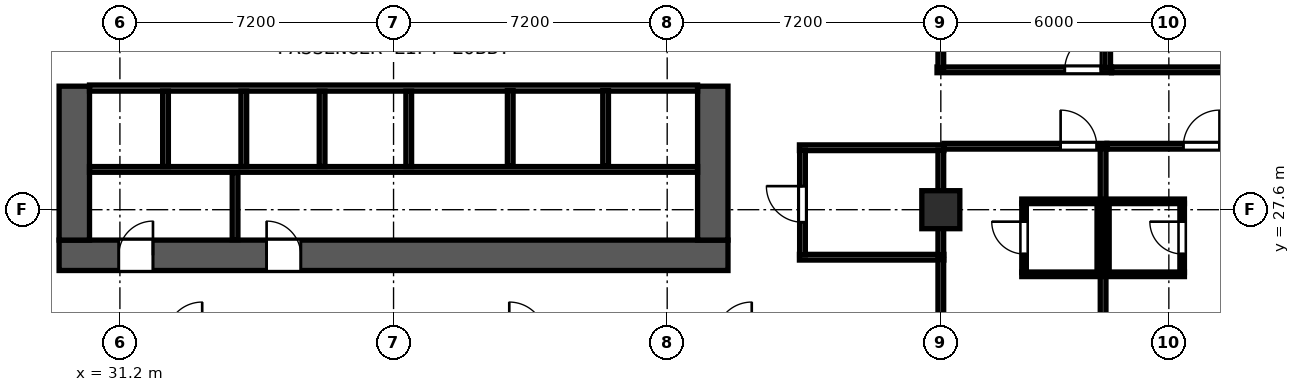
"""IFC4 building model, lengths in metres.
Left out: names, types, materials, properties, quantities, classifications, styles, units other than length and angle.
Written with IfcOpenShell. Run it as: python <this file> out.ifc"""

import sys

from ifc_helpers import new_model, si_unit, direction, frame, frame_2d, origin, origin_2d, place, context, subcontext, project, spatial, rectangle, hollow_rectangle, extrude, element, fill, save


model = new_model("IFC4")
c1 = context("Model", 3, precision=1e-05, world=origin(), true_north=direction((0.0, 1.0)))
c2 = subcontext(c1, "Body", "Model", "MODEL_VIEW")
j1 = project(units=[si_unit("LENGTHUNIT", "METRE"), si_unit("PLANEANGLEUNIT", "RADIAN")], contexts=[c1])
p1 = place(None, origin())
s1 = spatial("IfcSite", under=j1, at=p1, CompositionType="ELEMENT")
p2 = place(p1, origin())
s2 = spatial("IfcBuilding", under=s1, at=p2, CompositionType="ELEMENT")
p3 = place(p2, frame((0.0, 0.0, 62.8)))
s3 = spatial("IfcBuildingStorey", under=s2, at=p3, CompositionType="ELEMENT", Elevation=62.8)
p4 = place(p3, frame((29.6, 26.4, 0.0), z_axis=(0.0, 0.0, 1.0), x_axis=(1.0, 0.0, 0.0)))
e1 = element("IfcWall", 1, at=p4, inside=s3, PredefinedType="SHEAR", context=c2, shape_type="SweptSolid", body=[
    extrude(rectangle(XDim=17.6, YDim=0.8, at=frame_2d((8.8, 0.0))), origin(), (0.0, 0.0, 1.0), 3.6),
])
p5 = place(p4, frame((2.47, 0.0, 0.0), z_axis=(0.0, 0.0, 1.0), x_axis=(-1.0, 0.0, 0.0)))
e2 = element("IfcOpeningElement", 2, at=p5, cuts=e1, PredefinedType="OPENING", context=c2, shape_type="SweptSolid", body=[
    extrude(rectangle(XDim=0.9, YDim=2.1, at=frame_2d((0.45, 1.05))), frame((0.0, 0.41, 0.0), z_axis=(0.0, -1.0, 0.0), x_axis=(1.0, 0.0, 0.0)), (0.0, 0.0, 1.0), 0.82),
])
p6 = place(p4, frame((6.36, 0.0, 0.0), z_axis=(0.0, 0.0, 1.0), x_axis=(-1.0, 0.0, 0.0)))
e3 = element("IfcOpeningElement", 3, at=p6, cuts=e1, PredefinedType="OPENING", context=c2, shape_type="SweptSolid", body=[
    extrude(rectangle(XDim=0.9, YDim=2.1, at=frame_2d((0.45, 1.05))), frame((0.0, 0.41, 0.0), z_axis=(0.0, -1.0, 0.0), x_axis=(1.0, 0.0, 0.0)), (0.0, 0.0, 1.0), 0.82),
])
for number, where, z_axis, x_axis in (
    (4, (30.0, 26.8, 0.0), (0.0, 0.0, 1.0), (0.0, 1.0, 0.0)),
    (5, (46.8, 26.8, 0.0), (0.0, 0.0, 1.0), (0.0, 1.0, 0.0)),
):
    element("IfcWall", number, at=place(p3, frame(where, z_axis=z_axis, x_axis=x_axis)), inside=s3, PredefinedType="SHEAR", context=c2, shape_type="SweptSolid", body=[
        extrude(rectangle(XDim=4.05, YDim=0.8, at=frame_2d((2.025, 0.0))), origin(), (0.0, 0.0, 1.0), 3.6),
    ])
p7 = place(p3, frame((52.8, 27.6, 0.0), z_axis=(0.0, 0.0, 1.0), x_axis=(1.0, 0.0, 0.0)))
e6 = element("IfcColumn", 6, at=p7, inside=s3, PredefinedType="COLUMN", context=c2, shape_type="SweptSolid", body=[
    extrude(hollow_rectangle(XDim=1.0, YDim=1.0, WallThickness=0.038, at=origin_2d()), origin(), (0.0, 0.0, 1.0), 3.8),
])
p8 = place(p3, frame((30.4, 30.8, 0.0), z_axis=(0.0, 0.0, 1.0), x_axis=(1.0, 0.0, 0.0)))
e7 = element("IfcWall", 7, at=p8, inside=s3, PredefinedType="SOLIDWALL", context=c2, shape_type="SweptSolid", body=[
    extrude(rectangle(XDim=16.0, YDim=0.16, at=frame_2d((8.0, 0.0))), origin(), (0.0, 0.0, 1.0), 3.6),
])
p9 = place(p3, frame((30.4, 28.66, 0.0), z_axis=(0.0, 0.0, 1.0), x_axis=(1.0, 0.0, 0.0)))
e8 = element("IfcWall", 8, at=p9, inside=s3, PredefinedType="PARTITIONING", context=c2, shape_type="SweptSolid", body=[
    extrude(rectangle(XDim=16.0, YDim=0.15, at=frame_2d((8.0, 0.0))), origin(), (0.0, 0.0, 1.0), 3.6),
])
for number, where, z_axis, x_axis in (
    (9, (32.4, 28.735, 0.0), (0.0, 0.0, 1.0), (0.0, 1.0, 0.0)),
    (10, (34.46, 28.735, 0.0), (0.0, 0.0, 1.0), (0.0, 1.0, 0.0)),
    (11, (36.52, 28.735, 0.0), (0.0, 0.0, 1.0), (0.0, 1.0, 0.0)),
    (12, (38.8, 28.735, 0.0), (0.0, 0.0, 1.0), (0.0, 1.0, 0.0)),
):
    element("IfcWall", number, at=place(p3, frame(where, z_axis=z_axis, x_axis=x_axis)), inside=s3, PredefinedType="SOLIDWALL", context=c2, shape_type="SweptSolid", body=[
        extrude(rectangle(XDim=1.985, YDim=0.15, at=frame_2d((0.992, 0.0))), origin(), (0.0, 0.0, 1.0), 3.6),
    ])
p10 = place(p3, frame((34.23, 26.81, 0.0), z_axis=(0.0, 0.0, 1.0), x_axis=(0.0, 1.0, 0.0)))
e13 = element("IfcWall", 13, at=p10, inside=s3, PredefinedType="PARTITIONING", context=c2, shape_type="SweptSolid", body=[
    extrude(rectangle(XDim=1.77, YDim=0.15, at=frame_2d((0.885, 0.0))), origin(), (0.0, 0.0, 1.0), 3.6),
])
for number, where, z_axis, x_axis in (
    (14, (41.47, 28.75, 0.0), (0.0, 0.0, 1.0), (0.0, 1.0, 0.0)),
    (15, (43.98, 28.75, 0.0), (0.0, 0.0, 1.0), (0.0, 1.0, 0.0)),
):
    element("IfcWall", number, at=place(p3, frame(where, z_axis=z_axis, x_axis=x_axis)), inside=s3, PredefinedType="SOLIDWALL", context=c2, shape_type="SweptSolid", body=[
        extrude(rectangle(XDim=1.985, YDim=0.15, at=frame_2d((0.993, 0.0))), origin(), (0.0, 0.0, 1.0), 3.6),
    ])
for number, where, z_axis, x_axis in (
    (16, (49.08, 29.23, 0.0), (0.0, 0.0, 1.0), (1.0, 0.0, 0.0)),
    (17, (49.08, 26.35, 0.0), (0.0, 0.0, 1.0), (1.0, 0.0, 0.0)),
):
    element("IfcWall", number, at=place(p3, frame(where, z_axis=z_axis, x_axis=x_axis)), inside=s3, PredefinedType="PARTITIONING", context=c2, shape_type="SweptSolid", body=[
        extrude(rectangle(XDim=3.8, YDim=0.15, at=frame_2d((1.9, 0.0))), origin(), (0.0, 0.0, 1.0), 3.6),
    ])
p11 = place(p3, frame((49.16, 26.41, 0.0), z_axis=(0.0, 0.0, 1.0), x_axis=(0.0, 1.0, 0.0)))
e18 = element("IfcWall", 18, at=p11, inside=s3, PredefinedType="PARTITIONING", context=c2, shape_type="SweptSolid", body=[
    extrude(rectangle(XDim=2.76, YDim=0.15, at=frame_2d((1.38, 0.0))), origin(), (0.0, 0.0, 1.0), 3.6),
])
p12 = place(p11, frame((0.86, 0.0, 0.0)))
e19 = element("IfcOpeningElement", 19, at=p12, cuts=e18, PredefinedType="OPENING", context=c2, shape_type="SweptSolid", body=[
    extrude(rectangle(XDim=0.95, YDim=2.12, at=frame_2d((0.475, 1.06))), frame((0.0, 0.085, 0.0), z_axis=(0.0, -1.0, 0.0), x_axis=(1.0, 0.0, 0.0)), (0.0, 0.0, 1.0), 0.17),
])
p13 = place(p3, frame((52.8, 26.41, 0.0), z_axis=(0.0, 0.0, 1.0), x_axis=(0.0, 1.0, 0.0)))
e20 = element("IfcWall", 20, at=p13, inside=s3, PredefinedType="PARTITIONING", context=c2, shape_type="SweptSolid", body=[
    extrude(rectangle(XDim=2.76, YDim=0.15, at=frame_2d((1.38, 0.0))), origin(), (0.0, 0.0, 1.0), 3.097),
])
p14 = place(p3, frame((52.7, 31.28, 0.0), z_axis=(0.0, 0.0, 1.0), x_axis=(1.0, 0.0, 0.0)))
e21 = element("IfcWall", 21, at=p14, inside=s3, PredefinedType="PARTITIONING", context=c2, shape_type="SweptSolid", body=[
    extrude(rectangle(XDim=4.59, YDim=0.15, at=frame_2d((2.295, 0.0))), origin(), (0.0, 0.0, 1.0), 3.6),
])
p15 = place(p14, frame((3.361, 0.0, 0.0)))
e22 = element("IfcOpeningElement", 22, at=p15, cuts=e21, PredefinedType="OPENING", context=c2, shape_type="SweptSolid", body=[
    extrude(rectangle(XDim=0.95, YDim=2.15, at=frame_2d((0.475, 1.075))), frame((0.0, 0.085, 0.0), z_axis=(0.0, -1.0, 0.0), x_axis=(1.0, 0.0, 0.0)), (0.0, 0.0, 1.0), 0.17),
])
p16 = place(p3, frame((52.8, 31.34, 0.0), z_axis=(0.0, 0.0, 1.0), x_axis=(0.0, 1.0, 0.0)))
e23 = element("IfcWall", 23, at=p16, inside=s3, PredefinedType="PARTITIONING", context=c2, shape_type="SweptSolid", body=[
    extrude(rectangle(XDim=1.6, YDim=0.15, at=frame_2d((0.8, 0.0))), origin(), (0.0, 0.0, 1.0), 3.097),
])
p17 = place(p3, frame((57.19, 31.34, 0.0), z_axis=(0.0, 0.0, 1.0), x_axis=(0.0, 1.0, 0.0)))
e24 = element("IfcWall", 24, at=p17, inside=s3, PredefinedType="PARTITIONING", context=c2, shape_type="SweptSolid", body=[
    extrude(rectangle(XDim=11.359, YDim=0.15, at=frame_2d((5.68, 0.0))), origin(), (0.0, 0.0, 1.0), 3.6),
])
p18 = place(p3, frame((57.292, 31.28, 0.0), z_axis=(0.0, 0.0, 1.0), x_axis=(1.0, 0.0, 0.0)))
e25 = element("IfcWall", 25, at=p18, inside=s3, PredefinedType="PARTITIONING", context=c2, shape_type="SweptSolid", body=[
    extrude(rectangle(XDim=7.808, YDim=0.15, at=frame_2d((3.904, 0.0))), origin(), (0.0, 0.0, 1.0), 3.6),
])
p19 = place(p18, frame((3.551, 0.0, 0.0)))
e26 = element("IfcOpeningElement", 26, at=p19, cuts=e25, PredefinedType="OPENING", context=c2, shape_type="SweptSolid", body=[
    extrude(rectangle(XDim=0.95, YDim=2.18, at=frame_2d((0.475, 1.09))), frame((0.0, 0.085, 0.0), z_axis=(0.0, -1.0, 0.0), x_axis=(1.0, 0.0, 0.0)), (0.0, 0.0, 1.0), 0.17),
])
p20 = place(p3, frame((52.882, 29.27, 0.0), z_axis=(0.0, 0.0, 1.0), x_axis=(1.0, 0.0, 0.0)))
e27 = element("IfcWall", 27, at=p20, inside=s3, PredefinedType="PARTITIONING", context=c2, shape_type="SweptSolid", body=[
    extrude(rectangle(XDim=4.288, YDim=0.15, at=frame_2d((2.144, 0.0))), origin(), (0.0, 0.0, 1.0), 3.6),
])
p21 = place(p20, frame((4.02, 0.0, 0.0), z_axis=(0.0, 0.0, 1.0), x_axis=(-1.0, 0.0, 0.0)))
e28 = element("IfcOpeningElement", 28, at=p21, cuts=e27, PredefinedType="OPENING", context=c2, shape_type="SweptSolid", body=[
    extrude(rectangle(XDim=0.95, YDim=2.15, at=frame_2d((0.475, 1.075))), frame((0.0, 0.085, 0.0), z_axis=(0.0, -1.0, 0.0), x_axis=(1.0, 0.0, 0.0)), (0.0, 0.0, 1.0), 0.17),
])
p22 = place(p3, frame((52.8, 24.28, 0.0), z_axis=(0.0, 0.0, 1.0), x_axis=(0.0, 1.0, 0.0)))
e29 = element("IfcWall", 29, at=p22, inside=s3, PredefinedType="PARTITIONING", context=c2, shape_type="SweptSolid", body=[
    extrude(rectangle(XDim=2.01, YDim=0.15, at=frame_2d((1.005, 0.0))), origin(), (0.0, 0.0, 1.0), 3.097),
])
p23 = place(p3, frame((57.07, 18.803, 0.0), z_axis=(0.0, 0.0, 1.0), x_axis=(0.0, 1.0, 0.0)))
e30 = element("IfcWall", 30, at=p23, inside=s3, PredefinedType="PARTITIONING", context=c2, shape_type="SweptSolid", body=[
    extrude(rectangle(XDim=10.407, YDim=0.15, at=frame_2d((5.204, 0.0))), origin(), (0.0, 0.0, 1.0), 3.6),
])
p24 = place(p3, frame((54.93, 27.82, 0.0), z_axis=(0.0, 0.0, 1.0), x_axis=(1.0, 0.0, 0.0)))
e31 = element("IfcWall", 31, at=p24, inside=s3, PredefinedType="PARTITIONING", context=c2, shape_type="SweptSolid", body=[
    extrude(rectangle(XDim=2.08, YDim=0.12, at=frame_2d((1.04, 0.0))), origin(), (0.0, 0.0, 1.0), 3.097),
])
p25 = place(p3, frame((54.93, 25.9, 0.0), z_axis=(0.0, 0.0, 1.0), x_axis=(1.0, 0.0, 0.0)))
e32 = element("IfcWall", 32, at=p25, inside=s3, PredefinedType="PARTITIONING", context=c2, shape_type="SweptSolid", body=[
    extrude(rectangle(XDim=2.08, YDim=0.12, at=frame_2d((1.04, 0.0))), origin(), (0.0, 0.0, 1.0), 3.6),
])
p26 = place(p3, frame((54.99, 25.945, 0.0), z_axis=(0.0, 0.0, 1.0), x_axis=(0.0, 1.0, 0.0)))
e33 = element("IfcWall", 33, at=p26, inside=s3, PredefinedType="PARTITIONING", context=c2, shape_type="SweptSolid", body=[
    extrude(rectangle(XDim=1.83, YDim=0.12, at=frame_2d((0.915, 0.0))), origin(), (0.0, 0.0, 1.0), 3.6),
])
p27 = place(p26, frame((1.34, 0.0, 0.0), z_axis=(0.0, 0.0, 1.0), x_axis=(-1.0, 0.0, 0.0)))
e34 = element("IfcOpeningElement", 34, at=p27, cuts=e33, PredefinedType="OPENING", context=c2, shape_type="SweptSolid", body=[
    extrude(rectangle(XDim=0.85, YDim=2.1, at=frame_2d((0.425, 1.05))), frame((0.0, 0.07, 0.0), z_axis=(0.0, -1.0, 0.0), x_axis=(1.0, 0.0, 0.0)), (0.0, 0.0, 1.0), 0.14),
])
p28 = place(p3, frame((56.97, 25.945, 0.0), z_axis=(0.0, 0.0, 1.0), x_axis=(0.0, 1.0, 0.0)))
e35 = element("IfcWall", 35, at=p28, inside=s3, PredefinedType="PARTITIONING", context=c2, shape_type="SweptSolid", body=[
    extrude(rectangle(XDim=1.83, YDim=0.12, at=frame_2d((0.915, 0.0))), origin(), (0.0, 0.0, 1.0), 3.6),
])
p29 = place(p3, frame((57.172, 29.27, 0.0), z_axis=(0.0, 0.0, 1.0), x_axis=(1.0, 0.0, 0.0)))
e36 = element("IfcWall", 36, at=p29, inside=s3, PredefinedType="PARTITIONING", context=c2, shape_type="SweptSolid", body=[
    extrude(rectangle(XDim=4.268, YDim=0.15, at=frame_2d((2.134, 0.0))), origin(), (0.0, 0.0, 1.0), 3.6),
])
p30 = place(p29, frame((2.959, 0.0, 0.0), z_axis=(0.0, 0.0, 1.0), x_axis=(-1.0, 0.0, 0.0)))
e37 = element("IfcOpeningElement", 37, at=p30, cuts=e36, PredefinedType="OPENING", context=c2, shape_type="SweptSolid", body=[
    extrude(rectangle(XDim=0.95, YDim=2.15, at=frame_2d((0.475, 1.075))), frame((0.0, 0.085, 0.0), z_axis=(0.0, -1.0, 0.0), x_axis=(1.0, 0.0, 0.0)), (0.0, 0.0, 1.0), 0.17),
])
p31 = place(p3, frame((57.13, 27.82, 0.0), z_axis=(0.0, 0.0, 1.0), x_axis=(1.0, 0.0, 0.0)))
e38 = element("IfcWall", 38, at=p31, inside=s3, PredefinedType="PARTITIONING", context=c2, shape_type="SweptSolid", body=[
    extrude(rectangle(XDim=2.08, YDim=0.12, at=frame_2d((1.04, 0.0))), origin(), (0.0, 0.0, 1.0), 3.097),
])
p32 = place(p3, frame((57.13, 25.9, 0.0), z_axis=(0.0, 0.0, 1.0), x_axis=(1.0, 0.0, 0.0)))
e39 = element("IfcWall", 39, at=p32, inside=s3, PredefinedType="PARTITIONING", context=c2, shape_type="SweptSolid", body=[
    extrude(rectangle(XDim=2.08, YDim=0.12, at=frame_2d((1.04, 0.0))), origin(), (0.0, 0.0, 1.0), 3.6),
])
p33 = place(p3, frame((57.17, 25.945, 0.0), z_axis=(0.0, 0.0, 1.0), x_axis=(0.0, 1.0, 0.0)))
e40 = element("IfcWall", 40, at=p33, inside=s3, PredefinedType="PARTITIONING", context=c2, shape_type="SweptSolid", body=[
    extrude(rectangle(XDim=1.83, YDim=0.12, at=frame_2d((0.915, 0.0))), origin(), (0.0, 0.0, 1.0), 3.6),
])
p34 = place(p3, frame((59.15, 25.945, 0.0), z_axis=(0.0, 0.0, 1.0), x_axis=(0.0, 1.0, 0.0)))
e41 = element("IfcWall", 41, at=p34, inside=s3, PredefinedType="PARTITIONING", context=c2, shape_type="SweptSolid", body=[
    extrude(rectangle(XDim=1.83, YDim=0.12, at=frame_2d((0.915, 0.0))), origin(), (0.0, 0.0, 1.0), 3.6),
])
p35 = place(p34, frame((0.49, 0.0, 0.0)))
e42 = element("IfcOpeningElement", 42, at=p35, cuts=e41, PredefinedType="OPENING", context=c2, shape_type="SweptSolid", body=[
    extrude(rectangle(XDim=0.85, YDim=2.1, at=frame_2d((0.425, 1.05))), frame((0.0, 0.07, 0.0), z_axis=(0.0, -1.0, 0.0), x_axis=(1.0, 0.0, 0.0)), (0.0, 0.0, 1.0), 0.14),
])
p36 = place(p5, origin())
e43 = element("IfcDoor", 43, at=p36, inside=s3, OperationType="SINGLE_SWING_LEFT", PredefinedType="DOOR", context=c2, shape_type="SweptSolid", body=[
    extrude(rectangle(XDim=0.9, YDim=2.1, at=frame_2d((0.45, 1.05))), frame((0.0, -0.195, 0.0), z_axis=(0.0, -1.0, 0.0), x_axis=(1.0, 0.0, 0.0)), (0.0, 0.0, 1.0), 0.05),
])
fill(e2, e43)
p37 = place(p6, origin())
e44 = element("IfcDoor", 44, at=p37, inside=s3, OperationType="SINGLE_SWING_RIGHT", PredefinedType="DOOR", context=c2, shape_type="SweptSolid", body=[
    extrude(rectangle(XDim=0.9, YDim=2.1, at=frame_2d((0.45, 1.05))), frame((0.0, -0.195, 0.0), z_axis=(0.0, -1.0, 0.0), x_axis=(1.0, 0.0, 0.0)), (0.0, 0.0, 1.0), 0.05),
])
fill(e3, e44)
p38 = place(p12, origin())
e45 = element("IfcDoor", 45, at=p38, inside=s3, OperationType="SINGLE_SWING_RIGHT", PredefinedType="DOOR", context=c2, shape_type="SweptSolid", body=[
    extrude(rectangle(XDim=0.95, YDim=2.12, at=frame_2d((0.475, 1.06))), frame((0.0, 0.025, 0.0), z_axis=(0.0, -1.0, 0.0), x_axis=(1.0, 0.0, 0.0)), (0.0, 0.0, 1.0), 0.05),
])
fill(e19, e45)
p39 = place(p15, origin())
e46 = element("IfcDoor", 46, at=p39, inside=s3, OperationType="SINGLE_SWING_RIGHT", PredefinedType="DOOR", context=c2, shape_type="SweptSolid", body=[
    extrude(rectangle(XDim=0.95, YDim=2.15, at=frame_2d((0.475, 1.075))), frame((0.0, 0.025, 0.0), z_axis=(0.0, -1.0, 0.0), x_axis=(1.0, 0.0, 0.0)), (0.0, 0.0, 1.0), 0.05),
])
fill(e22, e46)
p40 = place(p21, origin())
e47 = element("IfcDoor", 47, at=p40, inside=s3, OperationType="SINGLE_SWING_RIGHT", PredefinedType="DOOR", context=c2, shape_type="SweptSolid", body=[
    extrude(rectangle(XDim=0.95, YDim=2.15, at=frame_2d((0.475, 1.075))), frame((0.0, 0.025, 0.0), z_axis=(0.0, -1.0, 0.0), x_axis=(1.0, 0.0, 0.0)), (0.0, 0.0, 1.0), 0.05),
])
fill(e28, e47)
p41 = place(p27, origin())
e48 = element("IfcDoor", 48, at=p41, inside=s3, OperationType="SINGLE_SWING_LEFT", PredefinedType="DOOR", context=c2, shape_type="SweptSolid", body=[
    extrude(rectangle(XDim=0.85, YDim=2.1, at=frame_2d((0.425, 1.05))), frame((0.0, 0.025, 0.0), z_axis=(0.0, -1.0, 0.0), x_axis=(1.0, 0.0, 0.0)), (0.0, 0.0, 1.0), 0.05),
])
fill(e34, e48)
p42 = place(p30, origin())
e49 = element("IfcDoor", 49, at=p42, inside=s3, OperationType="SINGLE_SWING_LEFT", PredefinedType="DOOR", context=c2, shape_type="SweptSolid", body=[
    extrude(rectangle(XDim=0.95, YDim=2.15, at=frame_2d((0.475, 1.075))), frame((0.0, 0.025, 0.0), z_axis=(0.0, -1.0, 0.0), x_axis=(1.0, 0.0, 0.0)), (0.0, 0.0, 1.0), 0.05),
])
fill(e37, e49)
p43 = place(p35, origin())
e50 = element("IfcDoor", 50, at=p43, inside=s3, OperationType="SINGLE_SWING_RIGHT", PredefinedType="DOOR", context=c2, shape_type="SweptSolid", body=[
    extrude(rectangle(XDim=0.85, YDim=2.1, at=frame_2d((0.425, 1.05))), frame((0.0, 0.025, 0.0), z_axis=(0.0, -1.0, 0.0), x_axis=(1.0, 0.0, 0.0)), (0.0, 0.0, 1.0), 0.05),
])
fill(e42, e50)
save(model, sys.argv[1])
